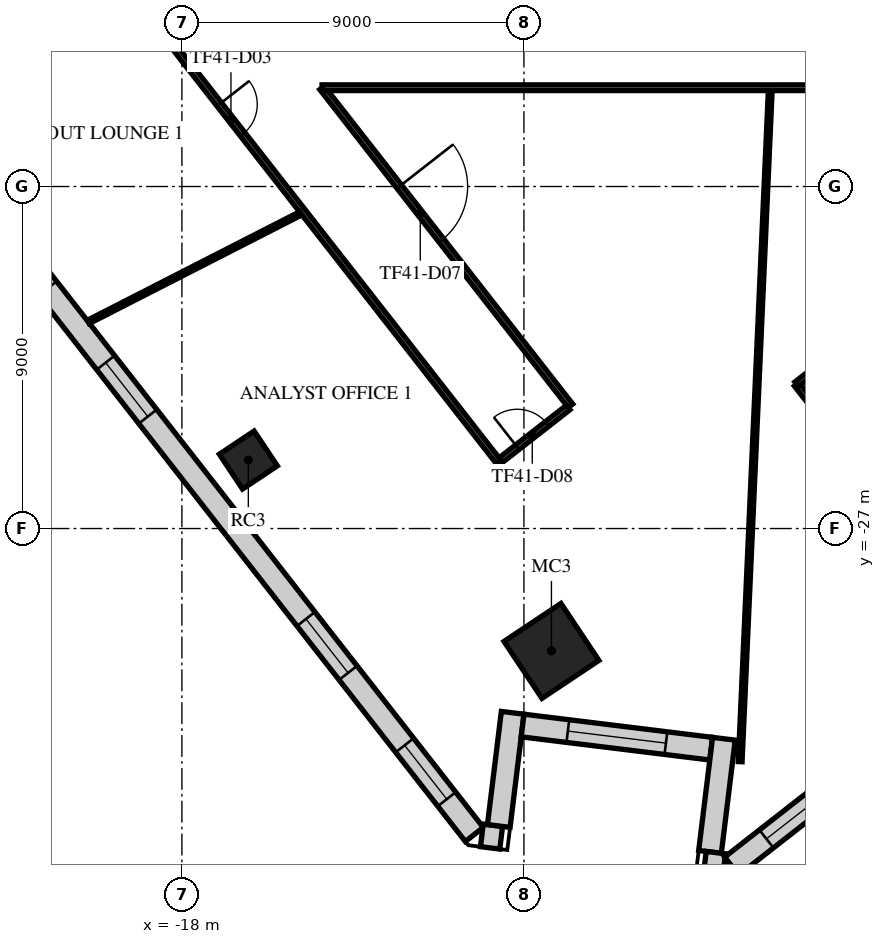
"""IFC4 building model, lengths in metres.
Left out: names, types, materials, properties, quantities, classifications, styles, units other than length and angle.
Written with IfcOpenShell. Run it as: python <this file> out.ifc"""

import sys

from ifc_helpers import new_model, si_unit, direction, frame, frame_2d, origin, origin_2d, place, context, subcontext, project, spatial, rectangle, extrude, element, fill, save


model = new_model("IFC4")
c1 = context("Model", 3, precision=1e-05, world=origin(), true_north=direction((0.0, 1.0)))
c2 = subcontext(c1, "Body", "Model", "MODEL_VIEW")
j1 = project(units=[si_unit("LENGTHUNIT", "METRE"), si_unit("PLANEANGLEUNIT", "RADIAN")], contexts=[c1])
p1 = place(None, origin())
s1 = spatial("IfcSite", under=j1, at=p1, CompositionType="ELEMENT")
p2 = place(p1, origin())
s2 = spatial("IfcBuilding", under=s1, at=p2, CompositionType="ELEMENT")
p3 = place(p2, frame((0.0, 0.0, 175.7)))
s3 = spatial("IfcBuildingStorey", under=s2, at=p3, CompositionType="ELEMENT", Elevation=175.7)
p4 = place(p3, frame((-16.252, -25.198, 0.0), z_axis=(0.0, 0.0, 1.0), x_axis=(0.832028680356, 0.55473261583, 0.0)))
e1 = element("IfcColumn", 1, at=p4, inside=s3, PredefinedType="COLUMN", context=c2, shape_type="SweptSolid", body=[
    extrude(rectangle(XDim=1.1, YDim=1.1, at=origin_2d()), origin(), (0.0, 0.0, 1.0), 4.0),
])
p5 = place(p3, frame((-8.276, -30.221, 0.0), z_axis=(0.0, 0.0, 1.0), x_axis=(0.832028680356, 0.55473261583, 0.0)))
e2 = element("IfcColumn", 2, at=p5, inside=s3, PredefinedType="COLUMN", context=c2, shape_type="SweptSolid", body=[
    extrude(rectangle(XDim=1.8, YDim=1.8, at=origin_2d()), origin(), (0.0, 0.0, 1.0), 4.0),
])
p6 = place(p3, frame((-36.503, -1.52, 0.0), z_axis=(0.0, 0.0, 1.0), x_axis=(0.615658293455, -0.788013239546, 0.0)))
e3 = element("IfcWall", 3, at=p6, inside=s3, PredefinedType="STANDARD", context=c2, shape_type="SweptSolid", body=[
    extrude(rectangle(XDim=42.552, YDim=0.6, at=frame_2d((21.276, 0.0))), origin(), (0.0, 0.0, 1.0), 3.6),
])
p7 = place(p6, frame((1.178, 0.0, 0.9)))
e4 = element("IfcOpeningElement", 4, at=p7, cuts=e3, PredefinedType="OPENING", context=c2, shape_type="SweptSolid", body=[
    extrude(rectangle(XDim=1.8, YDim=2.1, at=frame_2d((0.9, 1.05))), frame((0.0, 0.31, 0.0), z_axis=(0.0, -1.0, 0.0), x_axis=(1.0, 0.0, 0.0)), (0.0, 0.0, 1.0), 0.62),
])
p8 = place(p6, frame((5.396, 0.0, 0.9)))
e5 = element("IfcOpeningElement", 5, at=p8, cuts=e3, PredefinedType="OPENING", context=c2, shape_type="SweptSolid", body=[
    extrude(rectangle(XDim=1.8, YDim=2.1, at=frame_2d((0.9, 1.05))), frame((0.0, 0.31, 0.0), z_axis=(0.0, -1.0, 0.0), x_axis=(1.0, 0.0, 0.0)), (0.0, 0.0, 1.0), 0.62),
])
p9 = place(p6, frame((9.676, 0.0, 0.9)))
e6 = element("IfcOpeningElement", 6, at=p9, cuts=e3, PredefinedType="OPENING", context=c2, shape_type="SweptSolid", body=[
    extrude(rectangle(XDim=1.8, YDim=2.1, at=frame_2d((0.9, 1.05))), frame((0.0, 0.31, 0.0), z_axis=(0.0, -1.0, 0.0), x_axis=(1.0, 0.0, 0.0)), (0.0, 0.0, 1.0), 0.62),
])
p10 = place(p6, frame((13.956, 0.0, 0.9)))
e7 = element("IfcOpeningElement", 7, at=p10, cuts=e3, PredefinedType="OPENING", context=c2, shape_type="SweptSolid", body=[
    extrude(rectangle(XDim=1.8, YDim=2.1, at=frame_2d((0.9, 1.05))), frame((0.0, 0.31, 0.0), z_axis=(0.0, -1.0, 0.0), x_axis=(1.0, 0.0, 0.0)), (0.0, 0.0, 1.0), 0.62),
])
p11 = place(p6, frame((18.236, 0.0, 0.9)))
e8 = element("IfcOpeningElement", 8, at=p11, cuts=e3, PredefinedType="OPENING", context=c2, shape_type="SweptSolid", body=[
    extrude(rectangle(XDim=1.8, YDim=2.1, at=frame_2d((0.9, 1.05))), frame((0.0, 0.31, 0.0), z_axis=(0.0, -1.0, 0.0), x_axis=(1.0, 0.0, 0.0)), (0.0, 0.0, 1.0), 0.62),
])
p12 = place(p6, frame((22.516, 0.0, 0.9)))
e9 = element("IfcOpeningElement", 9, at=p12, cuts=e3, PredefinedType="OPENING", context=c2, shape_type="SweptSolid", body=[
    extrude(rectangle(XDim=1.8, YDim=2.1, at=frame_2d((0.9, 1.05))), frame((0.0, 0.31, 0.0), z_axis=(0.0, -1.0, 0.0), x_axis=(1.0, 0.0, 0.0)), (0.0, 0.0, 1.0), 0.62),
])
p13 = place(p6, frame((26.796, 0.0, 0.9)))
e10 = element("IfcOpeningElement", 10, at=p13, cuts=e3, PredefinedType="OPENING", context=c2, shape_type="SweptSolid", body=[
    extrude(rectangle(XDim=1.8, YDim=2.1, at=frame_2d((0.9, 1.05))), frame((0.0, 0.31, 0.0), z_axis=(0.0, -1.0, 0.0), x_axis=(1.0, 0.0, 0.0)), (0.0, 0.0, 1.0), 0.62),
])
p14 = place(p6, frame((35.356, 0.0, 0.9)))
e11 = element("IfcOpeningElement", 11, at=p14, cuts=e3, PredefinedType="OPENING", context=c2, shape_type="SweptSolid", body=[
    extrude(rectangle(XDim=1.8, YDim=2.1, at=frame_2d((0.9, 1.05))), frame((0.0, 0.31, 0.0), z_axis=(0.0, -1.0, 0.0), x_axis=(1.0, 0.0, 0.0)), (0.0, 0.0, 1.0), 0.62),
])
p15 = place(p6, frame((39.573, 0.0, 0.9)))
e12 = element("IfcOpeningElement", 12, at=p15, cuts=e3, PredefinedType="OPENING", context=c2, shape_type="SweptSolid", body=[
    extrude(rectangle(XDim=1.8, YDim=2.1, at=frame_2d((0.9, 1.05))), frame((0.0, 0.31, 0.0), z_axis=(0.0, -1.0, 0.0), x_axis=(1.0, 0.0, 0.0)), (0.0, 0.0, 1.0), 0.62),
])
p16 = place(p3, frame((-10.107, -35.075, 0.0), z_axis=(0.0, 0.0, 1.0), x_axis=(0.992554603024, -0.121800492671, 0.0)))
e13 = element("IfcWall", 13, at=p16, inside=s3, PredefinedType="STANDARD", context=c2, shape_type="SweptSolid", body=[
    extrude(rectangle(XDim=0.511, YDim=0.6, at=frame_2d((0.256, 0.0))), origin(), (0.0, 0.0, 1.0), 3.6),
])
p17 = place(p3, frame((-9.662, -34.827, 0.0), z_axis=(0.0, 0.0, 1.0), x_axis=(0.121901146576, 0.992542246186, 0.0)))
e14 = element("IfcWall", 14, at=p17, inside=s3, PredefinedType="STANDARD", context=c2, shape_type="SweptSolid", body=[
    extrude(rectangle(XDim=3.0, YDim=0.6, at=frame_2d((1.5, 0.0))), origin(), (0.0, 0.0, 1.0), 3.6),
])
p18 = place(p3, frame((-9.035, -32.184, 0.0), z_axis=(0.0, 0.0, 1.0), x_axis=(0.992545217041, -0.121876954874, 0.0)))
e15 = element("IfcWall", 15, at=p18, inside=s3, PredefinedType="STANDARD", context=c2, shape_type="SweptSolid", body=[
    extrude(rectangle(XDim=5.0, YDim=0.6, at=frame_2d((2.5, 0.0))), origin(), (0.0, 0.0, 1.0), 3.6),
])
p19 = place(p18, frame((1.2, 0.0, 0.9)))
e16 = element("IfcOpeningElement", 16, at=p19, cuts=e15, PredefinedType="OPENING", context=c2, shape_type="SweptSolid", body=[
    extrude(rectangle(XDim=2.6, YDim=2.1, at=frame_2d((1.3, 1.05))), frame((0.0, 0.31, 0.0), z_axis=(0.0, -1.0, 0.0), x_axis=(1.0, 0.0, 0.0)), (0.0, 0.0, 1.0), 0.62),
])
p20 = place(p3, frame((-3.738, -32.532, 0.0), z_axis=(0.0, 0.0, 1.0), x_axis=(-0.121901146576, -0.992542246186, 0.0)))
e17 = element("IfcWall", 17, at=p20, inside=s3, PredefinedType="STANDARD", context=c2, shape_type="SweptSolid", body=[
    extrude(rectangle(XDim=3.0, YDim=0.6, at=frame_2d((1.5, 0.0))), origin(), (0.0, 0.0, 1.0), 3.6),
])
p21 = place(p3, frame((-4.24, -35.795, 0.0), z_axis=(0.0, 0.0, 1.0), x_axis=(0.992554603024, -0.121800492671, 0.0)))
e18 = element("IfcWall", 18, at=p21, inside=s3, PredefinedType="STANDARD", context=c2, shape_type="SweptSolid", body=[
    extrude(rectangle(XDim=0.511, YDim=0.6, at=frame_2d((0.256, 0.0))), origin(), (0.0, 0.0, 1.0), 3.6),
])
p22 = place(p3, frame((-3.534, -35.882, 0.0), z_axis=(0.0, 0.0, 1.0), x_axis=(0.788011205374, 0.61566089709, 0.0)))
e19 = element("IfcWall", 19, at=p22, inside=s3, PredefinedType="STANDARD", context=c2, shape_type="SweptSolid", body=[
    extrude(rectangle(XDim=49.752, YDim=0.6, at=frame_2d((24.876, 0.0))), origin(), (0.0, 0.0, 1.0), 3.6),
])
p23 = place(p22, frame((1.161, 0.0, 0.9)))
e20 = element("IfcOpeningElement", 20, at=p23, cuts=e19, PredefinedType="OPENING", context=c2, shape_type="SweptSolid", body=[
    extrude(rectangle(XDim=2.1, YDim=2.1, at=frame_2d((1.05, 1.05))), frame((0.0, 0.31, 0.0), z_axis=(0.0, -1.0, 0.0), x_axis=(1.0, 0.0, 0.0)), (0.0, 0.0, 1.0), 0.62),
])
p24 = place(p22, frame((5.644, 0.0, 0.9)))
e21 = element("IfcOpeningElement", 21, at=p24, cuts=e19, PredefinedType="OPENING", context=c2, shape_type="SweptSolid", body=[
    extrude(rectangle(XDim=2.1, YDim=2.1, at=frame_2d((1.05, 1.05))), frame((0.0, 0.31, 0.0), z_axis=(0.0, -1.0, 0.0), x_axis=(1.0, 0.0, 0.0)), (0.0, 0.0, 1.0), 0.62),
])
p25 = place(p22, frame((10.189, 0.0, 0.9)))
e22 = element("IfcOpeningElement", 22, at=p25, cuts=e19, PredefinedType="OPENING", context=c2, shape_type="SweptSolid", body=[
    extrude(rectangle(XDim=2.1, YDim=2.1, at=frame_2d((1.05, 1.05))), frame((0.0, 0.31, 0.0), z_axis=(0.0, -1.0, 0.0), x_axis=(1.0, 0.0, 0.0)), (0.0, 0.0, 1.0), 0.62),
])
p26 = place(p22, frame((14.735, 0.0, 0.9)))
e23 = element("IfcOpeningElement", 23, at=p26, cuts=e19, PredefinedType="OPENING", context=c2, shape_type="SweptSolid", body=[
    extrude(rectangle(XDim=2.1, YDim=2.1, at=frame_2d((1.05, 1.05))), frame((0.0, 0.31, 0.0), z_axis=(0.0, -1.0, 0.0), x_axis=(1.0, 0.0, 0.0)), (0.0, 0.0, 1.0), 0.62),
])
p27 = place(p22, frame((19.28, 0.0, 0.9)))
e24 = element("IfcOpeningElement", 24, at=p27, cuts=e19, PredefinedType="OPENING", context=c2, shape_type="SweptSolid", body=[
    extrude(rectangle(XDim=2.1, YDim=2.1, at=frame_2d((1.05, 1.05))), frame((0.0, 0.31, 0.0), z_axis=(0.0, -1.0, 0.0), x_axis=(1.0, 0.0, 0.0)), (0.0, 0.0, 1.0), 0.62),
])
p28 = place(p22, frame((23.826, 0.0, 0.9)))
e25 = element("IfcOpeningElement", 25, at=p28, cuts=e19, PredefinedType="OPENING", context=c2, shape_type="SweptSolid", body=[
    extrude(rectangle(XDim=2.1, YDim=2.1, at=frame_2d((1.05, 1.05))), frame((0.0, 0.31, 0.0), z_axis=(0.0, -1.0, 0.0), x_axis=(1.0, 0.0, 0.0)), (0.0, 0.0, 1.0), 0.62),
])
p29 = place(p22, frame((28.371, 0.0, 0.9)))
e26 = element("IfcOpeningElement", 26, at=p29, cuts=e19, PredefinedType="OPENING", context=c2, shape_type="SweptSolid", body=[
    extrude(rectangle(XDim=2.1, YDim=2.1, at=frame_2d((1.05, 1.05))), frame((0.0, 0.31, 0.0), z_axis=(0.0, -1.0, 0.0), x_axis=(1.0, 0.0, 0.0)), (0.0, 0.0, 1.0), 0.62),
])
p30 = place(p22, frame((32.917, 0.0, 0.9)))
e27 = element("IfcOpeningElement", 27, at=p30, cuts=e19, PredefinedType="OPENING", context=c2, shape_type="SweptSolid", body=[
    extrude(rectangle(XDim=2.1, YDim=2.1, at=frame_2d((1.05, 1.05))), frame((0.0, 0.31, 0.0), z_axis=(0.0, -1.0, 0.0), x_axis=(1.0, 0.0, 0.0)), (0.0, 0.0, 1.0), 0.62),
])
p31 = place(p22, frame((37.462, 0.0, 0.9)))
e28 = element("IfcOpeningElement", 28, at=p31, cuts=e19, PredefinedType="OPENING", context=c2, shape_type="SweptSolid", body=[
    extrude(rectangle(XDim=2.1, YDim=2.1, at=frame_2d((1.05, 1.05))), frame((0.0, 0.31, 0.0), z_axis=(0.0, -1.0, 0.0), x_axis=(1.0, 0.0, 0.0)), (0.0, 0.0, 1.0), 0.62),
])
p32 = place(p22, frame((42.008, 0.0, 0.9)))
e29 = element("IfcOpeningElement", 29, at=p32, cuts=e19, PredefinedType="OPENING", context=c2, shape_type="SweptSolid", body=[
    extrude(rectangle(XDim=2.1, YDim=2.1, at=frame_2d((1.05, 1.05))), frame((0.0, 0.31, 0.0), z_axis=(0.0, -1.0, 0.0), x_axis=(1.0, 0.0, 0.0)), (0.0, 0.0, 1.0), 0.62),
])
p33 = place(p22, frame((46.491, 0.0, 0.9)))
e30 = element("IfcOpeningElement", 30, at=p33, cuts=e19, PredefinedType="OPENING", context=c2, shape_type="SweptSolid", body=[
    extrude(rectangle(XDim=2.1, YDim=2.1, at=frame_2d((1.05, 1.05))), frame((0.0, 0.31, 0.0), z_axis=(0.0, -1.0, 0.0), x_axis=(1.0, 0.0, 0.0)), (0.0, 0.0, 1.0), 0.62),
])
p34 = place(p3, frame((-26.789, -3.331, 0.0), z_axis=(0.0, 0.0, 1.0), x_axis=(0.615659714696, -0.788012129158, 0.0)))
e31 = element("IfcWall", 31, at=p34, inside=s3, PredefinedType="PARTITIONING", context=c2, shape_type="SweptSolid", body=[
    extrude(rectangle(XDim=27.811, YDim=0.15, at=frame_2d((13.905, 0.0))), origin(), (0.0, 0.0, 1.0), 3.15),
])
p35 = place(p34, frame((15.872, 0.0, 0.0)))
e32 = element("IfcOpeningElement", 32, at=p35, cuts=e31, PredefinedType="OPENING", context=c2, shape_type="SweptSolid", body=[
    extrude(rectangle(XDim=1.0, YDim=2.1, at=frame_2d((0.5, 1.05))), frame((0.0, 0.085, 0.0), z_axis=(0.0, -1.0, 0.0), x_axis=(1.0, 0.0, 0.0)), (0.0, 0.0, 1.0), 0.17),
])
p36 = place(p3, frame((-14.313, -15.401, 0.0), z_axis=(0.0, 0.0, 1.0), x_axis=(0.615613702547, -0.78804807546, 0.0)))
e33 = element("IfcWall", 33, at=p36, inside=s3, PredefinedType="PARTITIONING", context=c2, shape_type="SweptSolid", body=[
    extrude(rectangle(XDim=10.619, YDim=0.15, at=frame_2d((5.31, 0.0))), origin(), (0.0, 0.0, 1.0), 3.15),
])
p37 = place(p36, frame((3.3, 0.0, 0.0)))
e34 = element("IfcOpeningElement", 34, at=p37, cuts=e33, PredefinedType="OPENING", context=c2, shape_type="SweptSolid", body=[
    extrude(rectangle(XDim=1.8, YDim=2.1, at=frame_2d((0.9, 1.05))), frame((0.0, 0.085, 0.0), z_axis=(0.0, -1.0, 0.0), x_axis=(1.0, 0.0, 0.0)), (0.0, 0.0, 1.0), 0.17),
])
p38 = place(p3, frame((-14.312, -15.4, 0.0), z_axis=(0.0, 0.0, 1.0), x_axis=(1.0, 0.0, 0.0)))
e35 = element("IfcWall", 35, at=p38, inside=s3, PredefinedType="PARTITIONING", context=c2, shape_type="SweptSolid", body=[
    extrude(rectangle(XDim=22.125, YDim=0.15, at=frame_2d((11.062, 0.0))), origin(), (0.0, 0.0, 1.0), 3.15),
])
p39 = place(p3, frame((-9.608, -25.2, 0.0), z_axis=(0.0, 0.0, 1.0), x_axis=(0.788111579875, 0.6155324018, 0.0)))
e36 = element("IfcWall", 36, at=p39, inside=s3, PredefinedType="PARTITIONING", context=c2, shape_type="SweptSolid", body=[
    extrude(rectangle(XDim=2.249, YDim=0.15, at=frame_2d((1.125, 0.0))), origin(), (0.0, 0.0, 1.0), 3.15),
])
p40 = place(p39, frame((0.55, 0.0, 0.0)))
e37 = element("IfcOpeningElement", 37, at=p40, cuts=e36, PredefinedType="OPENING", context=c2, shape_type="SweptSolid", body=[
    extrude(rectangle(XDim=1.0, YDim=2.1, at=frame_2d((0.5, 1.05))), frame((0.0, 0.085, 0.0), z_axis=(0.0, -1.0, 0.0), x_axis=(1.0, 0.0, 0.0)), (0.0, 0.0, 1.0), 0.17),
])
p41 = place(p3, frame((-1.825, -23.204, 0.0), z_axis=(0.0, 0.0, 1.0), x_axis=(0.615792170082, -0.787908626216, 0.0)))
e38 = element("IfcWall", 38, at=p41, inside=s3, PredefinedType="PARTITIONING", context=c2, shape_type="SweptSolid", body=[
    extrude(rectangle(XDim=2.399, YDim=0.15, at=frame_2d((1.199, 0.0))), origin(), (0.0, 0.0, 1.0), 3.6),
])
p42 = place(p3, frame((-1.825, -23.203, 0.0), z_axis=(0.0, 0.0, 1.0), x_axis=(0.788016612455, 0.615653976269, 0.0)))
e39 = element("IfcWall", 39, at=p42, inside=s3, PredefinedType="PARTITIONING", context=c2, shape_type="SweptSolid", body=[
    extrude(rectangle(XDim=12.399, YDim=0.15, at=frame_2d((6.2, 0.0))), origin(), (0.0, 0.0, 1.0), 3.15),
])
p43 = place(p42, frame((7.492, 0.0, 0.0)))
e40 = element("IfcOpeningElement", 40, at=p43, cuts=e39, PredefinedType="OPENING", context=c2, shape_type="SweptSolid", body=[
    extrude(rectangle(XDim=1.0, YDim=2.1, at=frame_2d((0.5, 1.05))), frame((0.0, 0.085, 0.0), z_axis=(0.0, -1.0, 0.0), x_axis=(1.0, 0.0, 0.0)), (0.0, 0.0, 1.0), 0.17),
])
p44 = place(p3, frame((-20.461, -21.562, 0.0), z_axis=(0.0, 0.0, 1.0), x_axis=(0.890433278589, 0.455113805966, 0.0)))
e41 = element("IfcWall", 41, at=p44, inside=s3, PredefinedType="PARTITIONING", context=c2, shape_type="SweptSolid", body=[
    extrude(rectangle(XDim=6.266, YDim=0.1, at=frame_2d((3.133, 0.0))), origin(), (0.0, 0.0, 1.0), 2.9),
])
p45 = place(p3, frame((-3.31, -33.135, 0.0), z_axis=(0.0, 0.0, 1.0), x_axis=(0.044752286744, 0.998998114528, 0.0)))
e42 = element("IfcWall", 42, at=p45, inside=s3, PredefinedType="PARTITIONING", context=c2, shape_type="SweptSolid", body=[
    extrude(rectangle(XDim=17.676, YDim=0.1, at=frame_2d((8.838, 0.0))), origin(), (0.0, 0.0, 1.0), 2.9),
])
p46 = place(p13, origin())
e43 = element("IfcWindow", 43, at=p46, inside=s3, PartitioningType="SINGLE_PANEL", PredefinedType="WINDOW", context=c2, shape_type="SweptSolid", body=[
    extrude(rectangle(XDim=1.8, YDim=2.1, at=frame_2d((0.9, 1.05))), frame((0.0, 0.03, 0.0), z_axis=(0.0, -1.0, 0.0), x_axis=(1.0, 0.0, 0.0)), (0.0, 0.0, 1.0), 0.06),
])
fill(e10, e43)
p47 = place(p14, origin())
e44 = element("IfcWindow", 44, at=p47, inside=s3, PartitioningType="SINGLE_PANEL", PredefinedType="WINDOW", context=c2, shape_type="SweptSolid", body=[
    extrude(rectangle(XDim=1.8, YDim=2.1, at=frame_2d((0.9, 1.05))), frame((0.0, 0.03, 0.0), z_axis=(0.0, -1.0, 0.0), x_axis=(1.0, 0.0, 0.0)), (0.0, 0.0, 1.0), 0.06),
])
fill(e11, e44)
p48 = place(p15, origin())
e45 = element("IfcWindow", 45, at=p48, inside=s3, PartitioningType="SINGLE_PANEL", PredefinedType="WINDOW", context=c2, shape_type="SweptSolid", body=[
    extrude(rectangle(XDim=1.8, YDim=2.1, at=frame_2d((0.9, 1.05))), frame((0.0, 0.03, 0.0), z_axis=(0.0, -1.0, 0.0), x_axis=(1.0, 0.0, 0.0)), (0.0, 0.0, 1.0), 0.06),
])
fill(e12, e45)
p49 = place(p19, origin())
e46 = element("IfcWindow", 46, at=p49, inside=s3, PartitioningType="SINGLE_PANEL", PredefinedType="WINDOW", context=c2, shape_type="SweptSolid", body=[
    extrude(rectangle(XDim=2.6, YDim=2.1, at=frame_2d((1.3, 1.05))), frame((0.0, 0.03, 0.0), z_axis=(0.0, -1.0, 0.0), x_axis=(1.0, 0.0, 0.0)), (0.0, 0.0, 1.0), 0.06),
])
fill(e16, e46)
p50 = place(p23, origin())
e47 = element("IfcWindow", 47, at=p50, inside=s3, PartitioningType="SINGLE_PANEL", PredefinedType="WINDOW", context=c2, shape_type="SweptSolid", body=[
    extrude(rectangle(XDim=2.1, YDim=2.1, at=frame_2d((1.05, 1.05))), frame((0.0, 0.03, 0.0), z_axis=(0.0, -1.0, 0.0), x_axis=(1.0, 0.0, 0.0)), (0.0, 0.0, 1.0), 0.06),
])
fill(e20, e47)
p51 = place(p35, frame((1.0, 0.0, 0.0), z_axis=(0.0, 0.0, 1.0), x_axis=(-1.0, 0.0, 0.0)))
e48 = element("IfcDoor", 48, at=p51, inside=s3, OperationType="SINGLE_SWING_RIGHT", PredefinedType="DOOR", context=c2, shape_type="SweptSolid", body=[
    extrude(rectangle(XDim=1.0, YDim=2.1, at=frame_2d((0.5, 1.05))), frame((0.0, 0.025, 0.0), z_axis=(0.0, -1.0, 0.0), x_axis=(1.0, 0.0, 0.0)), (0.0, 0.0, 1.0), 0.05),
])
fill(e32, e48)
p52 = place(p37, origin())
e49 = element("IfcDoor", 49, at=p52, inside=s3, OperationType="DOUBLE_DOOR_SINGLE_SWING", PredefinedType="DOOR", context=c2, shape_type="SweptSolid", body=[
    extrude(rectangle(XDim=1.8, YDim=2.1, at=frame_2d((0.9, 1.05))), frame((0.0, 0.025, 0.0), z_axis=(0.0, -1.0, 0.0), x_axis=(1.0, 0.0, 0.0)), (0.0, 0.0, 1.0), 0.05),
])
fill(e34, e49)
p53 = place(p40, frame((1.0, 0.0, 0.0), z_axis=(0.0, 0.0, 1.0), x_axis=(-1.0, 0.0, 0.0)))
e50 = element("IfcDoor", 50, at=p53, inside=s3, OperationType="SINGLE_SWING_LEFT", PredefinedType="DOOR", context=c2, shape_type="SweptSolid", body=[
    extrude(rectangle(XDim=1.0, YDim=2.1, at=frame_2d((0.5, 1.05))), frame((0.0, 0.025, 0.0), z_axis=(0.0, -1.0, 0.0), x_axis=(1.0, 0.0, 0.0)), (0.0, 0.0, 1.0), 0.05),
])
fill(e37, e50)
save(model, sys.argv[1])
